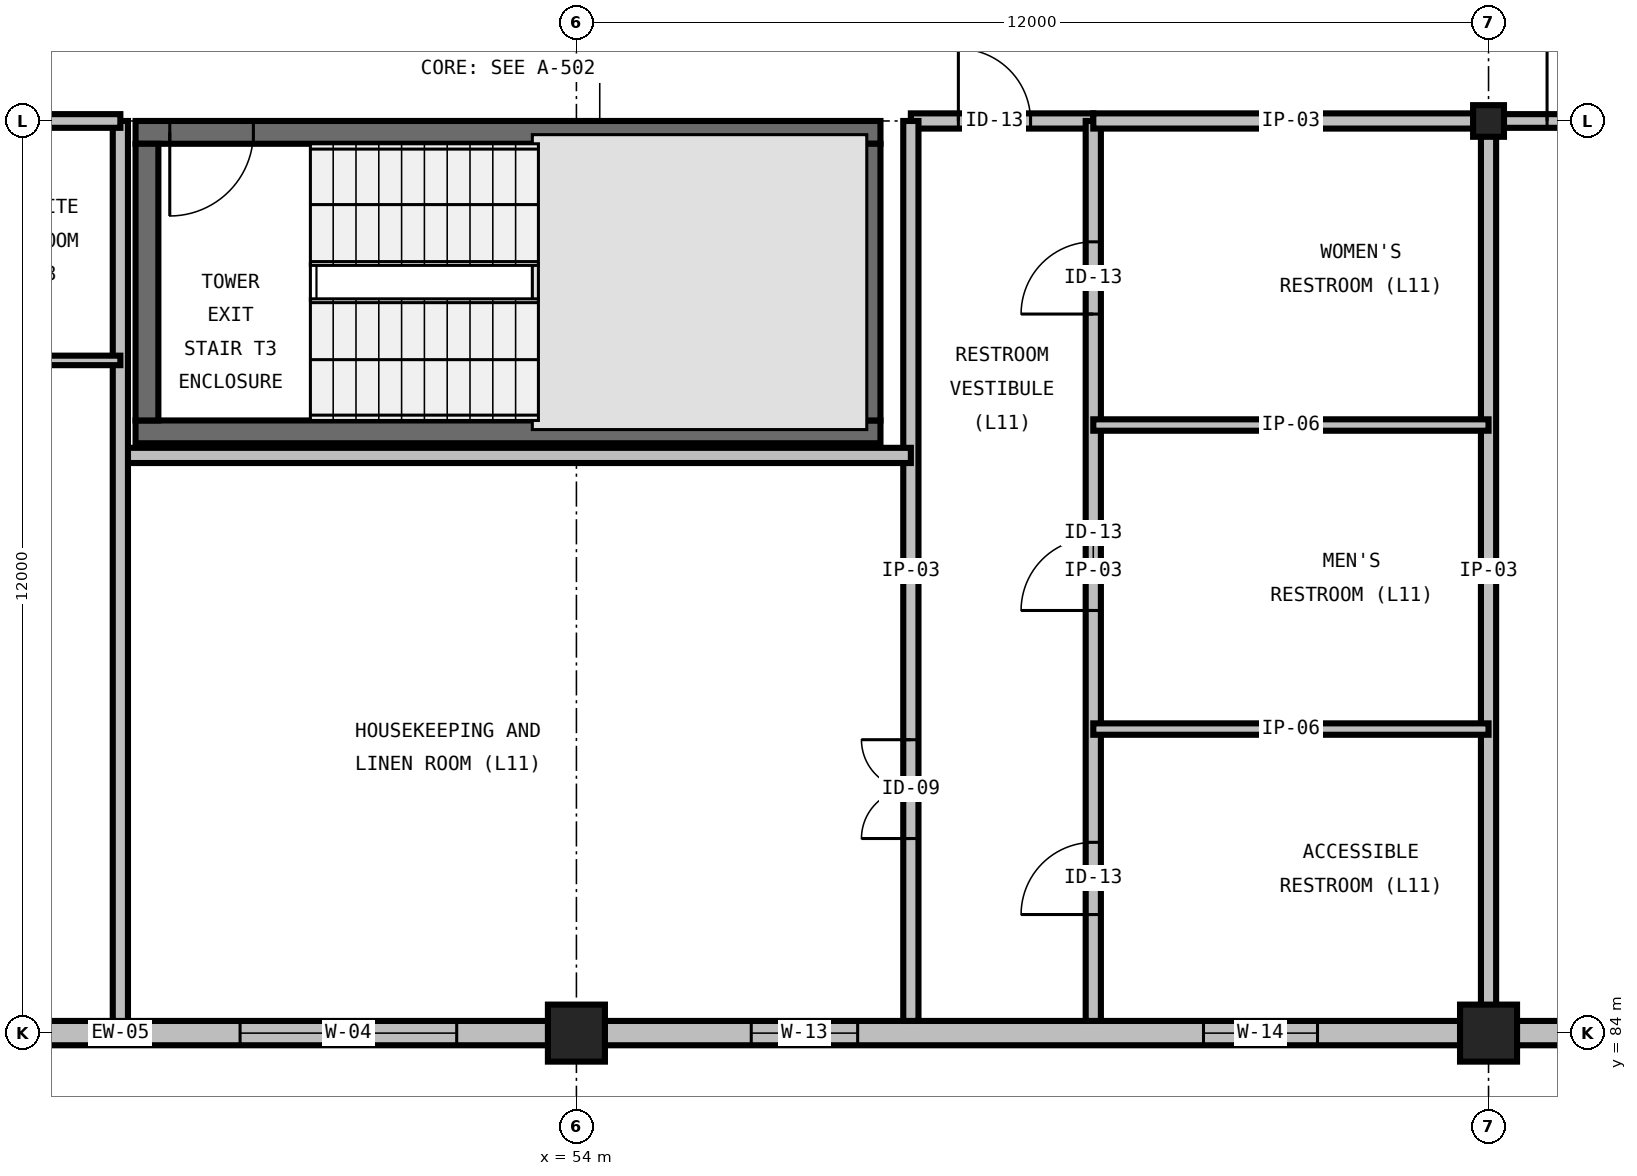
"""IFC4 building model, lengths in metres.
Left out: names, types, materials, properties, quantities, classifications, styles, units other than length and angle.
Written with IfcOpenShell. Run it as: python <this file> out.ifc"""

import sys

from ifc_helpers import new_model, si_unit, direction, frame, frame_2d, origin, origin_2d, place, context, subcontext, project, spatial, rectangle, i_section, extrude, element, fill, save


model = new_model("IFC4")
c1 = context("Model", 3, precision=1e-05, world=origin(), true_north=direction((0.0, 1.0)))
c2 = subcontext(c1, "Body", "Model", "MODEL_VIEW")
j1 = project(units=[si_unit("LENGTHUNIT", "METRE"), si_unit("PLANEANGLEUNIT", "RADIAN")], contexts=[c1])
p1 = place(None, origin())
s1 = spatial("IfcSite", under=j1, at=p1, CompositionType="ELEMENT")
p2 = place(p1, origin())
s2 = spatial("IfcBuilding", under=s1, at=p2, CompositionType="ELEMENT")
p3 = place(p2, frame((0.0, 0.0, 49.2)))
s3 = spatial("IfcBuildingStorey", under=s2, at=p3, CompositionType="ELEMENT", Elevation=49.2)
for number, where, z_axis, x_axis in (
    (1, (54.0, 84.0, 0.0), (0.0, 0.0, 1.0), (1.0, 0.0, 0.0)),
    (2, (66.0, 84.0, 0.0), (0.0, 0.0, 1.0), (1.0, 0.0, 0.0)),
):
    element("IfcColumn", number, at=place(p3, frame(where, z_axis=z_axis, x_axis=x_axis)), inside=s3, PredefinedType="COLUMN", context=c2, shape_type="SweptSolid", body=[
        extrude(rectangle(XDim=0.75, YDim=0.75, at=origin_2d()), origin(), (0.0, 0.0, 1.0), 3.6),
    ])
p4 = place(p3, frame((66.0, 96.0, 0.0), z_axis=(0.0, 0.0, 1.0), x_axis=(1.0, 0.0, 0.0)))
e3 = element("IfcColumn", 3, at=p4, inside=s3, PredefinedType="COLUMN", context=c2, shape_type="SweptSolid", body=[
    extrude(i_section(OverallWidth=0.406, OverallDepth=0.416, WebThickness=0.03, FlangeThickness=0.048, FilletRadius=0.031, at=origin_2d()), origin(), (0.0, 0.0, 1.0), 3.6),
])
p5 = place(p3, frame((48.2, 91.91, 0.0), z_axis=(0.0, 0.0, 1.0), x_axis=(1.0, 0.0, 0.0)))
e4 = element("IfcWall", 4, at=p5, inside=s3, PredefinedType="SHEAR", context=c2, shape_type="SweptSolid", body=[
    extrude(rectangle(XDim=9.8, YDim=0.3, at=frame_2d((4.9, 0.0))), origin(), (0.0, 0.0, 1.0), 3.6),
])
p6 = place(p3, frame((58.0, 95.85, 0.0), z_axis=(0.0, 0.0, 1.0), x_axis=(-1.0, 0.0, 0.0)))
e5 = element("IfcWall", 5, at=p6, inside=s3, PredefinedType="SHEAR", context=c2, shape_type="SweptSolid", body=[
    extrude(rectangle(XDim=9.8, YDim=0.3, at=frame_2d((4.9, 0.0))), origin(), (0.0, 0.0, 1.0), 3.6),
])
p7 = place(p6, frame((8.25, 0.0, 0.0)))
e6 = element("IfcOpeningElement", 6, at=p7, cuts=e5, PredefinedType="OPENING", context=c2, shape_type="SweptSolid", body=[
    extrude(rectangle(XDim=1.1, YDim=2.2, at=frame_2d((0.55, 1.1))), frame((0.0, 0.165, 0.0), z_axis=(0.0, -1.0, 0.0), x_axis=(1.0, 0.0, 0.0)), (0.0, 0.0, 1.0), 0.33),
])
for number, where, z_axis, x_axis in (
    (7, (48.35, 95.7, 0.0), (0.0, 0.0, 1.0), (0.0, -1.0, 0.0)),
    (8, (57.85, 92.06, 0.0), (0.0, 0.0, 1.0), (0.0, 1.0, 0.0)),
):
    element("IfcWall", number, at=place(p3, frame(where, z_axis=z_axis, x_axis=x_axis)), inside=s3, PredefinedType="SHEAR", context=c2, shape_type="SweptSolid", body=[
        extrude(rectangle(XDim=3.64, YDim=0.3, at=frame_2d((1.82, 0.0))), origin(), (0.0, 0.0, 1.0), 3.6),
    ])
p8 = place(p3, frame((42.0, 84.0, 0.0), z_axis=(0.0, 0.0, 1.0), x_axis=(1.0, 0.0, 0.0)))
e9 = element("IfcWall", 9, at=p8, inside=s3, PredefinedType="STANDARD", context=c2, shape_type="SweptSolid", body=[
    extrude(rectangle(XDim=12.0, YDim=0.32, at=frame_2d((6.0, 0.0))), origin(), (0.0, 0.0, 1.0), 2.536),
])
p9 = place(p8, frame((1.575, 0.0, 0.7)))
e10 = element("IfcOpeningElement", 10, at=p9, cuts=e9, PredefinedType="OPENING", context=c2, shape_type="SweptSolid", body=[
    extrude(rectangle(XDim=2.85, YDim=1.65, at=frame_2d((1.425, 0.825))), frame((0.0, 0.175, 0.0), z_axis=(0.0, -1.0, 0.0), x_axis=(1.0, 0.0, 0.0)), (0.0, 0.0, 1.0), 0.35),
])
p10 = place(p8, frame((7.575, 0.0, 0.7)))
e11 = element("IfcOpeningElement", 11, at=p10, cuts=e9, PredefinedType="OPENING", context=c2, shape_type="SweptSolid", body=[
    extrude(rectangle(XDim=2.85, YDim=1.65, at=frame_2d((1.425, 0.825))), frame((0.0, 0.175, 0.0), z_axis=(0.0, -1.0, 0.0), x_axis=(1.0, 0.0, 0.0)), (0.0, 0.0, 1.0), 0.35),
])
p11 = place(p3, frame((54.0, 84.0, 0.0), z_axis=(0.0, 0.0, 1.0), x_axis=(1.0, 0.0, 0.0)))
e12 = element("IfcWall", 12, at=p11, inside=s3, PredefinedType="STANDARD", context=c2, shape_type="SweptSolid", body=[
    extrude(rectangle(XDim=12.0, YDim=0.32, at=frame_2d((6.0, 0.0))), origin(), (0.0, 0.0, 1.0), 2.536),
])
p12 = place(p11, frame((2.3, 0.0, 1.0)))
e13 = element("IfcOpeningElement", 13, at=p12, cuts=e12, PredefinedType="OPENING", context=c2, shape_type="SweptSolid", body=[
    extrude(rectangle(XDim=1.4, YDim=1.4, at=frame_2d((0.7, 0.7))), frame((0.0, 0.175, 0.0), z_axis=(0.0, -1.0, 0.0), x_axis=(1.0, 0.0, 0.0)), (0.0, 0.0, 1.0), 0.35),
])
p13 = place(p11, frame((8.25, 0.0, 1.0)))
e14 = element("IfcOpeningElement", 14, at=p13, cuts=e12, PredefinedType="OPENING", context=c2, shape_type="SweptSolid", body=[
    extrude(rectangle(XDim=1.5, YDim=1.35, at=frame_2d((0.75, 0.675))), frame((0.0, 0.175, 0.0), z_axis=(0.0, -1.0, 0.0), x_axis=(1.0, 0.0, 0.0)), (0.0, 0.0, 1.0), 0.35),
])
p14 = place(p3, frame((66.0, 84.0, 0.0), z_axis=(0.0, 0.0, 1.0), x_axis=(1.0, 0.0, 0.0)))
e15 = element("IfcWall", 15, at=p14, inside=s3, PredefinedType="STANDARD", context=c2, shape_type="SweptSolid", body=[
    extrude(rectangle(XDim=12.0, YDim=0.32, at=frame_2d((6.0, 0.0))), origin(), (0.0, 0.0, 1.0), 2.536),
])
p15 = place(p14, frame((1.575, 0.0, 0.7)))
e16 = element("IfcOpeningElement", 16, at=p15, cuts=e15, PredefinedType="OPENING", context=c2, shape_type="SweptSolid", body=[
    extrude(rectangle(XDim=2.85, YDim=1.65, at=frame_2d((1.425, 0.825))), frame((0.0, 0.175, 0.0), z_axis=(0.0, -1.0, 0.0), x_axis=(1.0, 0.0, 0.0)), (0.0, 0.0, 1.0), 0.35),
])
p16 = place(p14, frame((7.575, 0.0, 0.7)))
e17 = element("IfcOpeningElement", 17, at=p16, cuts=e15, PredefinedType="OPENING", context=c2, shape_type="SweptSolid", body=[
    extrude(rectangle(XDim=2.85, YDim=1.65, at=frame_2d((1.425, 0.825))), frame((0.0, 0.175, 0.0), z_axis=(0.0, -1.0, 0.0), x_axis=(1.0, 0.0, 0.0)), (0.0, 0.0, 1.0), 0.35),
])
p17 = place(p3, frame((58.4, 96.0, 0.0), z_axis=(0.0, 0.0, 1.0), x_axis=(1.0, 0.0, 0.0)))
e18 = element("IfcWall", 18, at=p17, inside=s3, PredefinedType="PARTITIONING", context=c2, shape_type="SweptSolid", body=[
    extrude(rectangle(XDim=2.4, YDim=0.2, at=frame_2d((1.2, 0.0))), origin(), (0.0, 0.0, 1.0), 2.359),
])
p18 = place(p17, frame((0.625, 0.0, 0.0)))
e19 = element("IfcOpeningElement", 19, at=p18, cuts=e18, PredefinedType="OPENING", context=c2, shape_type="SweptSolid", body=[
    extrude(rectangle(XDim=0.95, YDim=2.15, at=frame_2d((0.475, 1.075))), frame((0.0, 0.115, 0.0), z_axis=(0.0, -1.0, 0.0), x_axis=(1.0, 0.0, 0.0)), (0.0, 0.0, 1.0), 0.23),
])
p19 = place(p3, frame((58.4, 84.16, 0.0), z_axis=(0.0, 0.0, 1.0), x_axis=(0.0, 1.0, 0.0)))
e20 = element("IfcWall", 20, at=p19, inside=s3, PredefinedType="PARTITIONING", context=c2, shape_type="SweptSolid", body=[
    extrude(rectangle(XDim=11.84, YDim=0.2, at=frame_2d((5.92, 0.0))), origin(), (0.0, 0.0, 1.0), 3.29),
])
p20 = place(p19, frame((2.4, 0.0, 0.0)))
e21 = element("IfcOpeningElement", 21, at=p20, cuts=e20, PredefinedType="OPENING", context=c2, shape_type="SweptSolid", body=[
    extrude(rectangle(XDim=1.3, YDim=2.2, at=frame_2d((0.65, 1.1))), frame((0.0, 0.115, 0.0), z_axis=(0.0, -1.0, 0.0), x_axis=(1.0, 0.0, 0.0)), (0.0, 0.0, 1.0), 0.23),
])
p21 = place(p3, frame((60.8, 84.16, 0.0), z_axis=(0.0, 0.0, 1.0), x_axis=(0.0, 1.0, 0.0)))
e22 = element("IfcWall", 22, at=p21, inside=s3, PredefinedType="PARTITIONING", context=c2, shape_type="SweptSolid", body=[
    extrude(rectangle(XDim=11.84, YDim=0.2, at=frame_2d((5.92, 0.0))), origin(), (0.0, 0.0, 1.0), 3.29),
])
p22 = place(p21, frame((1.4, 0.0, 0.0)))
e23 = element("IfcOpeningElement", 23, at=p22, cuts=e22, PredefinedType="OPENING", context=c2, shape_type="SweptSolid", body=[
    extrude(rectangle(XDim=0.95, YDim=2.15, at=frame_2d((0.475, 1.075))), frame((0.0, 0.115, 0.0), z_axis=(0.0, -1.0, 0.0), x_axis=(1.0, 0.0, 0.0)), (0.0, 0.0, 1.0), 0.23),
])
p23 = place(p21, frame((5.4, 0.0, 0.0)))
e24 = element("IfcOpeningElement", 24, at=p23, cuts=e22, PredefinedType="OPENING", context=c2, shape_type="SweptSolid", body=[
    extrude(rectangle(XDim=0.95, YDim=2.15, at=frame_2d((0.475, 1.075))), frame((0.0, 0.115, 0.0), z_axis=(0.0, -1.0, 0.0), x_axis=(1.0, 0.0, 0.0)), (0.0, 0.0, 1.0), 0.23),
])
p24 = place(p21, frame((9.3, 0.0, 0.0)))
e25 = element("IfcOpeningElement", 25, at=p24, cuts=e22, PredefinedType="OPENING", context=c2, shape_type="SweptSolid", body=[
    extrude(rectangle(XDim=0.95, YDim=2.15, at=frame_2d((0.475, 1.075))), frame((0.0, 0.115, 0.0), z_axis=(0.0, -1.0, 0.0), x_axis=(1.0, 0.0, 0.0)), (0.0, 0.0, 1.0), 0.23),
])
p25 = place(p3, frame((66.0, 84.16, 0.0), z_axis=(0.0, 0.0, 1.0), x_axis=(0.0, 1.0, 0.0)))
e26 = element("IfcWall", 26, at=p25, inside=s3, PredefinedType="PARTITIONING", context=c2, shape_type="SweptSolid", body=[
    extrude(rectangle(XDim=11.84, YDim=0.2, at=frame_2d((5.92, 0.0))), origin(), (0.0, 0.0, 1.0), 2.59),
])
p26 = place(p3, frame((60.8, 96.0, 0.0), z_axis=(0.0, 0.0, 1.0), x_axis=(1.0, 0.0, 0.0)))
e27 = element("IfcWall", 27, at=p26, inside=s3, PredefinedType="PARTITIONING", context=c2, shape_type="SweptSolid", body=[
    extrude(rectangle(XDim=5.2, YDim=0.2, at=frame_2d((2.6, 0.0))), origin(), (0.0, 0.0, 1.0), 2.359),
])
for number, where, z_axis, x_axis in (
    (28, (60.8, 88.0, 0.0), (0.0, 0.0, 1.0), (1.0, 0.0, 0.0)),
    (29, (60.8, 92.0, 0.0), (0.0, 0.0, 1.0), (1.0, 0.0, 0.0)),
):
    element("IfcWall", number, at=place(p3, frame(where, z_axis=z_axis, x_axis=x_axis)), inside=s3, PredefinedType="PARTITIONING", context=c2, shape_type="SweptSolid", body=[
        extrude(rectangle(XDim=5.2, YDim=0.15, at=frame_2d((2.6, 0.0))), origin(), (0.0, 0.0, 1.0), 3.29),
    ])
p27 = place(p3, frame((48.0, 91.6, 0.0), z_axis=(0.0, 0.0, 1.0), x_axis=(1.0, 0.0, 0.0)))
e30 = element("IfcWall", 30, at=p27, inside=s3, PredefinedType="PARTITIONING", context=c2, shape_type="SweptSolid", body=[
    extrude(rectangle(XDim=10.4, YDim=0.2, at=frame_2d((5.2, 0.0))), origin(), (0.0, 0.0, 1.0), 3.29),
])
p28 = place(p3, frame((48.0, 84.16, 0.0), z_axis=(0.0, 0.0, 1.0), x_axis=(0.0, 1.0, 0.0)))
e31 = element("IfcWall", 31, at=p28, inside=s3, PredefinedType="PARTITIONING", context=c2, shape_type="SweptSolid", body=[
    extrude(rectangle(XDim=11.84, YDim=0.2, at=frame_2d((5.92, 0.0))), origin(), (0.0, 0.0, 1.0), 3.29),
])
p29 = place(p3, frame((42.0, 96.0, 0.0), z_axis=(0.0, 0.0, 1.0), x_axis=(1.0, 0.0, 0.0)))
e32 = element("IfcWall", 32, at=p29, inside=s3, PredefinedType="PARTITIONING", context=c2, shape_type="SweptSolid", body=[
    extrude(rectangle(XDim=6.0, YDim=0.18, at=frame_2d((3.0, 0.0))), origin(), (0.0, 0.0, 1.0), 2.359),
])
p30 = place(p29, frame((0.77, 0.0, 0.0)))
e33 = element("IfcOpeningElement", 33, at=p30, cuts=e32, PredefinedType="OPENING", context=c2, shape_type="SweptSolid", body=[
    extrude(rectangle(XDim=1.0, YDim=2.15, at=frame_2d((0.5, 1.075))), frame((0.0, 0.105, 0.0), z_axis=(0.0, -1.0, 0.0), x_axis=(1.0, 0.0, 0.0)), (0.0, 0.0, 1.0), 0.21),
])
p31 = place(p3, frame((45.48, 92.85, 0.0), z_axis=(0.0, 0.0, 1.0), x_axis=(1.0, 0.0, 0.0)))
e34 = element("IfcWall", 34, at=p31, inside=s3, PredefinedType="PARTITIONING", context=c2, shape_type="SweptSolid", body=[
    extrude(rectangle(XDim=2.52, YDim=0.125, at=frame_2d((1.26, 0.0))), origin(), (0.0, 0.0, 1.0), 3.29),
])
p32 = place(p3, frame((66.0, 96.0, 0.0), z_axis=(0.0, 0.0, 1.0), x_axis=(1.0, 0.0, 0.0)))
e35 = element("IfcWall", 35, at=p32, inside=s3, PredefinedType="PARTITIONING", context=c2, shape_type="SweptSolid", body=[
    extrude(rectangle(XDim=6.0, YDim=0.18, at=frame_2d((3.0, 0.0))), origin(), (0.0, 0.0, 1.0), 2.664),
])
p33 = place(p32, frame((0.77, 0.0, 0.0)))
e36 = element("IfcOpeningElement", 36, at=p33, cuts=e35, PredefinedType="OPENING", context=c2, shape_type="SweptSolid", body=[
    extrude(rectangle(XDim=1.0, YDim=2.15, at=frame_2d((0.5, 1.075))), frame((0.0, 0.105, 0.0), z_axis=(0.0, -1.0, 0.0), x_axis=(1.0, 0.0, 0.0)), (0.0, 0.0, 1.0), 0.21),
])
p34 = place(p7, origin())
e37 = element("IfcDoor", 37, at=p34, inside=s3, OperationType="SINGLE_SWING_RIGHT", PredefinedType="DOOR", context=c2, shape_type="SweptSolid", body=[
    extrude(rectangle(XDim=1.1, YDim=2.2, at=frame_2d((0.55, 1.1))), frame((0.0, 0.025, 0.0), z_axis=(0.0, -1.0, 0.0), x_axis=(1.0, 0.0, 0.0)), (0.0, 0.0, 1.0), 0.05),
])
fill(e6, e37)
p35 = place(p10, origin())
e38 = element("IfcWindow", 38, at=p35, inside=s3, PartitioningType="TRIPLE_PANEL_VERTICAL", PredefinedType="WINDOW", context=c2, shape_type="SweptSolid", body=[
    extrude(rectangle(XDim=2.85, YDim=1.65, at=frame_2d((1.425, 0.825))), frame((0.0, 0.03, 0.0), z_axis=(0.0, -1.0, 0.0), x_axis=(1.0, 0.0, 0.0)), (0.0, 0.0, 1.0), 0.06),
])
fill(e11, e38)
p36 = place(p12, origin())
e39 = element("IfcWindow", 39, at=p36, inside=s3, PartitioningType="SINGLE_PANEL", PredefinedType="WINDOW", context=c2, shape_type="SweptSolid", body=[
    extrude(rectangle(XDim=1.4, YDim=1.4, at=frame_2d((0.7, 0.7))), frame((0.0, 0.03, 0.0), z_axis=(0.0, -1.0, 0.0), x_axis=(1.0, 0.0, 0.0)), (0.0, 0.0, 1.0), 0.06),
])
fill(e13, e39)
p37 = place(p13, origin())
e40 = element("IfcWindow", 40, at=p37, inside=s3, PartitioningType="SINGLE_PANEL", PredefinedType="WINDOW", context=c2, shape_type="SweptSolid", body=[
    extrude(rectangle(XDim=1.5, YDim=1.35, at=frame_2d((0.75, 0.675))), frame((0.0, 0.03, 0.0), z_axis=(0.0, -1.0, 0.0), x_axis=(1.0, 0.0, 0.0)), (0.0, 0.0, 1.0), 0.06),
])
fill(e14, e40)
p38 = place(p18, origin())
e41 = element("IfcDoor", 41, at=p38, inside=s3, OperationType="SINGLE_SWING_LEFT", PredefinedType="DOOR", context=c2, shape_type="SweptSolid", body=[
    extrude(rectangle(XDim=0.95, YDim=2.15, at=frame_2d((0.475, 1.075))), frame((0.0, 0.025, 0.0), z_axis=(0.0, -1.0, 0.0), x_axis=(1.0, 0.0, 0.0)), (0.0, 0.0, 1.0), 0.05),
])
fill(e19, e41)
p39 = place(p20, origin())
e42 = element("IfcDoor", 42, at=p39, inside=s3, OperationType="DOUBLE_DOOR_SINGLE_SWING", PredefinedType="DOOR", context=c2, shape_type="SweptSolid", body=[
    extrude(rectangle(XDim=1.3, YDim=2.2, at=frame_2d((0.65, 1.1))), frame((0.0, 0.025, 0.0), z_axis=(0.0, -1.0, 0.0), x_axis=(1.0, 0.0, 0.0)), (0.0, 0.0, 1.0), 0.05),
])
fill(e21, e42)
p40 = place(p22, origin())
e43 = element("IfcDoor", 43, at=p40, inside=s3, OperationType="SINGLE_SWING_LEFT", PredefinedType="DOOR", context=c2, shape_type="SweptSolid", body=[
    extrude(rectangle(XDim=0.95, YDim=2.15, at=frame_2d((0.475, 1.075))), frame((0.0, 0.025, 0.0), z_axis=(0.0, -1.0, 0.0), x_axis=(1.0, 0.0, 0.0)), (0.0, 0.0, 1.0), 0.05),
])
fill(e23, e43)
p41 = place(p23, origin())
e44 = element("IfcDoor", 44, at=p41, inside=s3, OperationType="SINGLE_SWING_LEFT", PredefinedType="DOOR", context=c2, shape_type="SweptSolid", body=[
    extrude(rectangle(XDim=0.95, YDim=2.15, at=frame_2d((0.475, 1.075))), frame((0.0, 0.025, 0.0), z_axis=(0.0, -1.0, 0.0), x_axis=(1.0, 0.0, 0.0)), (0.0, 0.0, 1.0), 0.05),
])
fill(e24, e44)
p42 = place(p24, origin())
e45 = element("IfcDoor", 45, at=p42, inside=s3, OperationType="SINGLE_SWING_LEFT", PredefinedType="DOOR", context=c2, shape_type="SweptSolid", body=[
    extrude(rectangle(XDim=0.95, YDim=2.15, at=frame_2d((0.475, 1.075))), frame((0.0, 0.025, 0.0), z_axis=(0.0, -1.0, 0.0), x_axis=(1.0, 0.0, 0.0)), (0.0, 0.0, 1.0), 0.05),
])
fill(e25, e45)
p43 = place(p33, origin())
e46 = element("IfcDoor", 46, at=p43, inside=s3, OperationType="SINGLE_SWING_LEFT", PredefinedType="DOOR", context=c2, shape_type="SweptSolid", body=[
    extrude(rectangle(XDim=1.0, YDim=2.15, at=frame_2d((0.5, 1.075))), frame((0.0, 0.025, 0.0), z_axis=(0.0, -1.0, 0.0), x_axis=(1.0, 0.0, 0.0)), (0.0, 0.0, 1.0), 0.05),
])
fill(e36, e46)
save(model, sys.argv[1])
